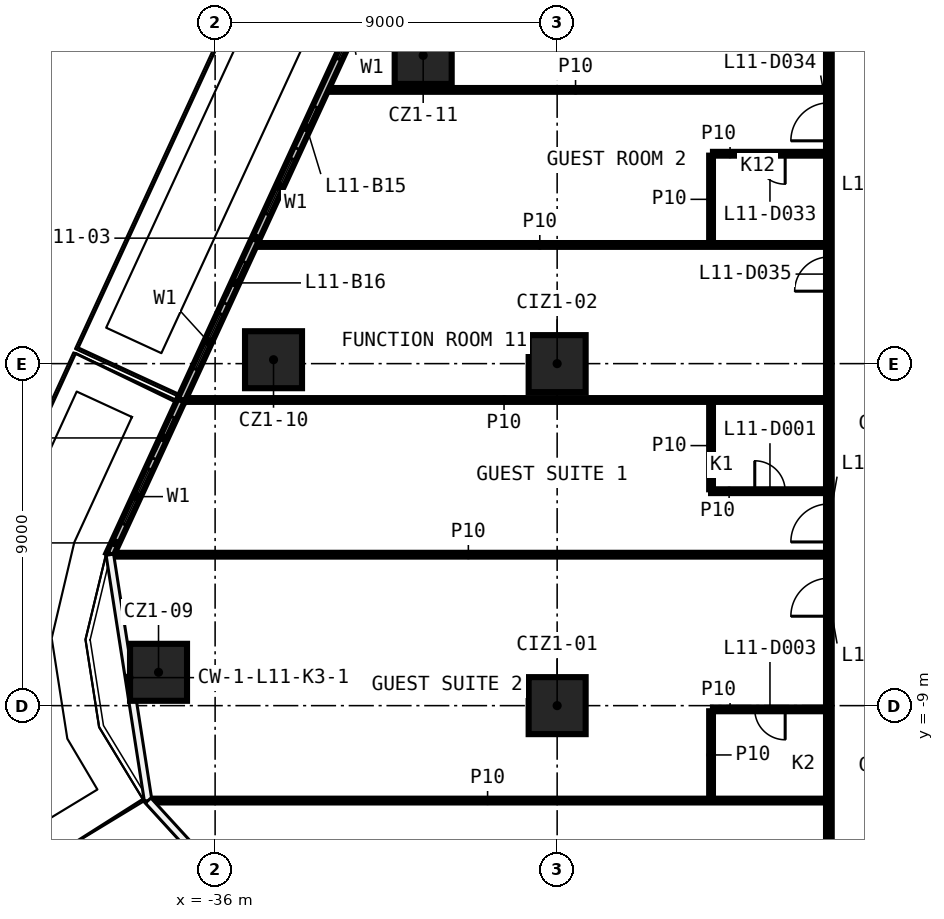
"""IFC4 building model, lengths in metres.
Left out: names, types, materials, properties, quantities, classifications, styles, units other than length and angle.
Written with IfcOpenShell. Run it as: python <this file> out.ifc"""

import sys

from ifc_helpers import new_model, si_unit, direction, frame, frame_2d, origin, origin_2d, place, context, subcontext, project, spatial, rectangle, extrude, element, fill, save


model = new_model("IFC4")
c1 = context("Model", 3, precision=1e-05, world=origin(), true_north=direction((0.0, 1.0)))
c2 = subcontext(c1, "Body", "Model", "MODEL_VIEW")
j1 = project(units=[si_unit("LENGTHUNIT", "METRE"), si_unit("PLANEANGLEUNIT", "RADIAN")], contexts=[c1])
p1 = place(None, origin())
s1 = spatial("IfcSite", under=j1, at=p1, CompositionType="ELEMENT")
p2 = place(p1, origin())
s2 = spatial("IfcBuilding", under=s1, at=p2, CompositionType="ELEMENT")
p3 = place(p2, frame((0.0, 0.0, 62.5)))
s3 = spatial("IfcBuildingStorey", under=s2, at=p3, CompositionType="ELEMENT", Elevation=62.5)
for number, where, z_axis, x_axis in (
    (1, (-37.489, -8.123, 0.0), (0.0, 0.0, 1.0), (1.0, 0.0, 0.0)),
    (2, (-34.463, 0.103, 0.0), (0.0, 0.0, 1.0), (1.0, 0.0, 0.0)),
    (3, (-30.525, 8.111, 0.0), (0.0, 0.0, 1.0), (1.0, 0.0, 0.0)),
    (4, (-27.0, -9.0, 0.0), (0.0, 0.0, 1.0), (1.0, 0.0, 0.0)),
    (5, (-27.0, 0.0, 0.0), (0.0, 0.0, 1.0), (1.0, 0.0, 0.0)),
):
    element("IfcColumn", number, at=place(p3, frame(where, z_axis=z_axis, x_axis=x_axis)), inside=s3, PredefinedType="COLUMN", context=c2, shape_type="SweptSolid", body=[
        extrude(rectangle(XDim=1.5, YDim=1.5, at=origin_2d()), origin(), (0.0, 0.0, 1.0), 3.3),
    ])
p4 = place(p3, frame((-37.736, -11.498, 0.0), z_axis=(0.0, 0.0, 1.0), x_axis=(1.0, 0.0, 0.0)))
e6 = element("IfcWall", 6, at=p4, inside=s3, PredefinedType="PARTITIONING", context=c2, shape_type="SweptSolid", body=[
    extrude(rectangle(XDim=17.811, YDim=0.1, at=frame_2d((8.905, 0.0))), origin(), (0.0, 0.0, 1.0), 3.3),
])
p5 = place(p3, frame((-19.925, -9.098, 0.0), z_axis=(0.0, 0.0, 1.0), x_axis=(-1.0, 0.0, 0.0)))
e7 = element("IfcWall", 7, at=p5, inside=s3, PredefinedType="PARTITIONING", context=c2, shape_type="SweptSolid", body=[
    extrude(rectangle(XDim=2.975, YDim=0.1, at=frame_2d((1.487, 0.0))), origin(), (0.0, 0.0, 1.0), 3.3),
])
p6 = place(p5, frame((1.075, 0.0, 0.0)))
e8 = element("IfcOpeningElement", 8, at=p6, cuts=e7, PredefinedType="OPENING", context=c2, shape_type="SweptSolid", body=[
    extrude(rectangle(XDim=0.8, YDim=2.1, at=frame_2d((0.4, 1.05))), frame((0.0, 0.06, 0.0), z_axis=(0.0, -1.0, 0.0), x_axis=(1.0, 0.0, 0.0)), (0.0, 0.0, 1.0), 0.12),
])
p7 = place(p3, frame((-38.748, -5.028, 0.0), z_axis=(0.0, 0.0, 1.0), x_axis=(1.0, 0.0, 0.0)))
e9 = element("IfcWall", 9, at=p7, inside=s3, PredefinedType="PARTITIONING", context=c2, shape_type="SweptSolid", body=[
    extrude(rectangle(XDim=18.823, YDim=0.1, at=frame_2d((9.411, 0.0))), origin(), (0.0, 0.0, 1.0), 3.3),
])
p8 = place(p3, frame((-22.95, -3.357, 0.0), z_axis=(0.0, 0.0, 1.0), x_axis=(1.0, 0.0, 0.0)))
e10 = element("IfcWall", 10, at=p8, inside=s3, PredefinedType="PARTITIONING", context=c2, shape_type="SweptSolid", body=[
    extrude(rectangle(XDim=3.025, YDim=0.1, at=frame_2d((1.512, 0.0))), origin(), (0.0, 0.0, 1.0), 3.3),
])
p9 = place(p8, frame((1.15, 0.0, 0.0)))
e11 = element("IfcOpeningElement", 11, at=p9, cuts=e10, PredefinedType="OPENING", context=c2, shape_type="SweptSolid", body=[
    extrude(rectangle(XDim=0.8, YDim=2.1, at=frame_2d((0.4, 1.05))), frame((0.0, 0.06, 0.0), z_axis=(0.0, -1.0, 0.0), x_axis=(1.0, 0.0, 0.0)), (0.0, 0.0, 1.0), 0.12),
])
p10 = place(p3, frame((-36.87, -0.957, 0.0), z_axis=(0.0, 0.0, 1.0), x_axis=(1.0, 0.0, 0.0)))
e12 = element("IfcWall", 12, at=p10, inside=s3, PredefinedType="PARTITIONING", context=c2, shape_type="SweptSolid", body=[
    extrude(rectangle(XDim=16.945, YDim=0.1, at=frame_2d((8.472, 0.0))), origin(), (0.0, 0.0, 1.0), 3.3),
])
p11 = place(p3, frame((-34.988, 3.123, 0.0), z_axis=(0.0, 0.0, 1.0), x_axis=(1.0, 0.0, 0.0)))
e13 = element("IfcWall", 13, at=p11, inside=s3, PredefinedType="PARTITIONING", context=c2, shape_type="SweptSolid", body=[
    extrude(rectangle(XDim=15.063, YDim=0.1, at=frame_2d((7.531, 0.0))), origin(), (0.0, 0.0, 1.0), 3.3),
])
p12 = place(p3, frame((-19.925, 5.523, 0.0), z_axis=(0.0, 0.0, 1.0), x_axis=(-1.0, 0.0, 0.0)))
e14 = element("IfcWall", 14, at=p12, inside=s3, PredefinedType="PARTITIONING", context=c2, shape_type="SweptSolid", body=[
    extrude(rectangle(XDim=2.975, YDim=0.1, at=frame_2d((1.487, 0.0))), origin(), (0.0, 0.0, 1.0), 3.3),
])
p13 = place(p12, frame((1.075, 0.0, 0.0)))
e15 = element("IfcOpeningElement", 15, at=p13, cuts=e14, PredefinedType="OPENING", context=c2, shape_type="SweptSolid", body=[
    extrude(rectangle(XDim=0.8, YDim=2.1, at=frame_2d((0.4, 1.05))), frame((0.0, 0.06, 0.0), z_axis=(0.0, -1.0, 0.0), x_axis=(1.0, 0.0, 0.0)), (0.0, 0.0, 1.0), 0.12),
])
p14 = place(p3, frame((-33.106, 7.203, 0.0), z_axis=(0.0, 0.0, 1.0), x_axis=(1.0, 0.0, 0.0)))
e16 = element("IfcWall", 16, at=p14, inside=s3, PredefinedType="PARTITIONING", context=c2, shape_type="SweptSolid", body=[
    extrude(rectangle(XDim=13.181, YDim=0.1, at=frame_2d((6.591, 0.0))), origin(), (0.0, 0.0, 1.0), 3.3),
])
p15 = place(p3, frame((-19.85, -16.775, 0.0), z_axis=(0.0, 0.0, 1.0), x_axis=(0.0, 1.0, 0.0)))
e17 = element("IfcWall", 17, at=p15, inside=s3, PredefinedType="PARTITIONING", context=c2, shape_type="SweptSolid", body=[
    extrude(rectangle(XDim=33.55, YDim=0.15, at=frame_2d((16.775, 0.0))), origin(), (0.0, 0.0, 1.0), 3.3),
])
p16 = place(p15, frame((12.083, 0.0, 0.0)))
e18 = element("IfcOpeningElement", 18, at=p16, cuts=e17, PredefinedType="OPENING", context=c2, shape_type="SweptSolid", body=[
    extrude(rectangle(XDim=1.0, YDim=2.1, at=frame_2d((0.5, 1.05))), frame((0.0, 0.085, 0.0), z_axis=(0.0, -1.0, 0.0), x_axis=(1.0, 0.0, 0.0)), (0.0, 0.0, 1.0), 0.17),
])
p17 = place(p15, frame((10.128, 0.0, 0.0)))
e19 = element("IfcOpeningElement", 19, at=p17, cuts=e17, PredefinedType="OPENING", context=c2, shape_type="SweptSolid", body=[
    extrude(rectangle(XDim=1.0, YDim=2.1, at=frame_2d((0.5, 1.05))), frame((0.0, 0.085, 0.0), z_axis=(0.0, -1.0, 0.0), x_axis=(1.0, 0.0, 0.0)), (0.0, 0.0, 1.0), 0.17),
])
p18 = place(p15, frame((3.259, 0.0, 0.0)))
e20 = element("IfcOpeningElement", 20, at=p18, cuts=e17, PredefinedType="OPENING", context=c2, shape_type="SweptSolid", body=[
    extrude(rectangle(XDim=0.9, YDim=2.1, at=frame_2d((0.45, 1.05))), frame((0.0, 0.085, 0.0), z_axis=(0.0, -1.0, 0.0), x_axis=(1.0, 0.0, 0.0)), (0.0, 0.0, 1.0), 0.17),
])
p19 = place(p15, frame((30.799, 0.0, 0.0)))
e21 = element("IfcOpeningElement", 21, at=p19, cuts=e17, PredefinedType="OPENING", context=c2, shape_type="SweptSolid", body=[
    extrude(rectangle(XDim=1.0, YDim=2.1, at=frame_2d((0.5, 1.05))), frame((0.0, 0.085, 0.0), z_axis=(0.0, -1.0, 0.0), x_axis=(1.0, 0.0, 0.0)), (0.0, 0.0, 1.0), 0.17),
])
p20 = place(p15, frame((22.638, 0.0, 0.0)))
e22 = element("IfcOpeningElement", 22, at=p20, cuts=e17, PredefinedType="OPENING", context=c2, shape_type="SweptSolid", body=[
    extrude(rectangle(XDim=1.0, YDim=2.1, at=frame_2d((0.5, 1.05))), frame((0.0, 0.085, 0.0), z_axis=(0.0, -1.0, 0.0), x_axis=(1.0, 0.0, 0.0)), (0.0, 0.0, 1.0), 0.17),
])
p21 = place(p15, frame((18.681, 0.0, 0.0)))
e23 = element("IfcOpeningElement", 23, at=p21, cuts=e17, PredefinedType="OPENING", context=c2, shape_type="SweptSolid", body=[
    extrude(rectangle(XDim=0.9, YDim=2.1, at=frame_2d((0.45, 1.05))), frame((0.0, 0.085, 0.0), z_axis=(0.0, -1.0, 0.0), x_axis=(1.0, 0.0, 0.0)), (0.0, 0.0, 1.0), 0.17),
])
for number, where, z_axis, x_axis in (
    (24, (-22.95, -11.448, 0.0), (0.0, 0.0, 1.0), (0.0, 1.0, 0.0)),
    (25, (-22.95, -3.307, 0.0), (0.0, 0.0, 1.0), (0.0, 1.0, 0.0)),
):
    element("IfcWall", number, at=place(p3, frame(where, z_axis=z_axis, x_axis=x_axis)), inside=s3, PredefinedType="PARTITIONING", context=c2, shape_type="SweptSolid", body=[
        extrude(rectangle(XDim=2.3, YDim=0.1, at=frame_2d((1.15, 0.0))), origin(), (0.0, 0.0, 1.0), 3.3),
    ])
p22 = place(p3, frame((-22.95, 3.173, 0.0), z_axis=(0.0, 0.0, 1.0), x_axis=(0.0, 1.0, 0.0)))
e26 = element("IfcWall", 26, at=p22, inside=s3, PredefinedType="PARTITIONING", context=c2, shape_type="SweptSolid", body=[
    extrude(rectangle(XDim=2.3, YDim=0.1, at=frame_2d((1.15, 0.0))), origin(), (0.0, 0.0, 1.0), 3.3),
])
p23 = place(p3, frame((-25.601, 23.524, 0.0), z_axis=(0.0, 0.0, 1.0), x_axis=(-0.418809499218, -0.908074117771, 0.0)))
e27 = element("IfcWall", 27, at=p23, inside=s3, PredefinedType="SOLIDWALL", context=c2, shape_type="SweptSolid", body=[
    extrude(rectangle(XDim=26.959, YDim=0.2, at=frame_2d((13.479, 0.0))), origin(), (0.0, 0.0, 1.0), 3.3),
])
p24 = place(p23, frame((2.0, 0.0, 0.6)))
e28 = element("IfcOpeningElement", 28, at=p24, cuts=e27, PredefinedType="OPENING", context=c2, shape_type="SweptSolid", body=[
    extrude(rectangle(XDim=1.6, YDim=2.4, at=frame_2d((0.8, 1.2))), frame((0.0, 0.11, 0.0), z_axis=(0.0, -1.0, 0.0), x_axis=(1.0, 0.0, 0.0)), (0.0, 0.0, 1.0), 0.22),
])
p25 = place(p23, frame((0.5, 0.0, 0.0)))
e29 = element("IfcOpeningElement", 29, at=p25, cuts=e27, PredefinedType="OPENING", context=c2, shape_type="SweptSolid", body=[
    extrude(rectangle(XDim=1.2, YDim=2.4, at=frame_2d((0.6, 1.2))), frame((0.0, 0.11, 0.0), z_axis=(0.0, -1.0, 0.0), x_axis=(1.0, 0.0, 0.0)), (0.0, 0.0, 1.0), 0.22),
])
p26 = place(p23, frame((6.493, 0.0, 0.6)))
e30 = element("IfcOpeningElement", 30, at=p26, cuts=e27, PredefinedType="OPENING", context=c2, shape_type="SweptSolid", body=[
    extrude(rectangle(XDim=1.6, YDim=2.4, at=frame_2d((0.8, 1.2))), frame((0.0, 0.11, 0.0), z_axis=(0.0, -1.0, 0.0), x_axis=(1.0, 0.0, 0.0)), (0.0, 0.0, 1.0), 0.22),
])
p27 = place(p23, frame((4.993, 0.0, 0.0)))
e31 = element("IfcOpeningElement", 31, at=p27, cuts=e27, PredefinedType="OPENING", context=c2, shape_type="SweptSolid", body=[
    extrude(rectangle(XDim=1.2, YDim=2.4, at=frame_2d((0.6, 1.2))), frame((0.0, 0.11, 0.0), z_axis=(0.0, -1.0, 0.0), x_axis=(1.0, 0.0, 0.0)), (0.0, 0.0, 1.0), 0.22),
])
p28 = place(p23, frame((10.987, 0.0, 0.6)))
e32 = element("IfcOpeningElement", 32, at=p28, cuts=e27, PredefinedType="OPENING", context=c2, shape_type="SweptSolid", body=[
    extrude(rectangle(XDim=1.6, YDim=2.4, at=frame_2d((0.8, 1.2))), frame((0.0, 0.11, 0.0), z_axis=(0.0, -1.0, 0.0), x_axis=(1.0, 0.0, 0.0)), (0.0, 0.0, 1.0), 0.22),
])
p29 = place(p23, frame((9.487, 0.0, 0.0)))
e33 = element("IfcOpeningElement", 33, at=p29, cuts=e27, PredefinedType="OPENING", context=c2, shape_type="SweptSolid", body=[
    extrude(rectangle(XDim=1.2, YDim=2.4, at=frame_2d((0.6, 1.2))), frame((0.0, 0.11, 0.0), z_axis=(0.0, -1.0, 0.0), x_axis=(1.0, 0.0, 0.0)), (0.0, 0.0, 1.0), 0.22),
])
p30 = place(p23, frame((15.48, 0.0, 0.6)))
e34 = element("IfcOpeningElement", 34, at=p30, cuts=e27, PredefinedType="OPENING", context=c2, shape_type="SweptSolid", body=[
    extrude(rectangle(XDim=1.6, YDim=2.4, at=frame_2d((0.8, 1.2))), frame((0.0, 0.11, 0.0), z_axis=(0.0, -1.0, 0.0), x_axis=(1.0, 0.0, 0.0)), (0.0, 0.0, 1.0), 0.22),
])
p31 = place(p23, frame((13.98, 0.0, 0.0)))
e35 = element("IfcOpeningElement", 35, at=p31, cuts=e27, PredefinedType="OPENING", context=c2, shape_type="SweptSolid", body=[
    extrude(rectangle(XDim=1.2, YDim=2.4, at=frame_2d((0.6, 1.2))), frame((0.0, 0.11, 0.0), z_axis=(0.0, -1.0, 0.0), x_axis=(1.0, 0.0, 0.0)), (0.0, 0.0, 1.0), 0.22),
])
p32 = place(p23, frame((19.973, 0.0, 0.6)))
e36 = element("IfcOpeningElement", 36, at=p32, cuts=e27, PredefinedType="OPENING", context=c2, shape_type="SweptSolid", body=[
    extrude(rectangle(XDim=1.6, YDim=2.4, at=frame_2d((0.8, 1.2))), frame((0.0, 0.11, 0.0), z_axis=(0.0, -1.0, 0.0), x_axis=(1.0, 0.0, 0.0)), (0.0, 0.0, 1.0), 0.22),
])
p33 = place(p23, frame((18.473, 0.0, 0.0)))
e37 = element("IfcOpeningElement", 37, at=p33, cuts=e27, PredefinedType="OPENING", context=c2, shape_type="SweptSolid", body=[
    extrude(rectangle(XDim=1.2, YDim=2.4, at=frame_2d((0.6, 1.2))), frame((0.0, 0.11, 0.0), z_axis=(0.0, -1.0, 0.0), x_axis=(1.0, 0.0, 0.0)), (0.0, 0.0, 1.0), 0.22),
])
p34 = place(p23, frame((24.466, 0.0, 0.6)))
e38 = element("IfcOpeningElement", 38, at=p34, cuts=e27, PredefinedType="OPENING", context=c2, shape_type="SweptSolid", body=[
    extrude(rectangle(XDim=1.6, YDim=2.4, at=frame_2d((0.8, 1.2))), frame((0.0, 0.11, 0.0), z_axis=(0.0, -1.0, 0.0), x_axis=(1.0, 0.0, 0.0)), (0.0, 0.0, 1.0), 0.22),
])
p35 = place(p23, frame((22.966, 0.0, 0.0)))
e39 = element("IfcOpeningElement", 39, at=p35, cuts=e27, PredefinedType="OPENING", context=c2, shape_type="SweptSolid", body=[
    extrude(rectangle(XDim=1.2, YDim=2.4, at=frame_2d((0.6, 1.2))), frame((0.0, 0.11, 0.0), z_axis=(0.0, -1.0, 0.0), x_axis=(1.0, 0.0, 0.0)), (0.0, 0.0, 1.0), 0.22),
])
p36 = place(p3, frame((-36.892, -0.957, 0.0), z_axis=(0.0, 0.0, 1.0), x_axis=(-0.418806078916, -0.908075695228, 0.0)))
e40 = element("IfcWall", 40, at=p36, inside=s3, PredefinedType="SOLIDWALL", context=c2, shape_type="SweptSolid", body=[
    extrude(rectangle(XDim=4.483, YDim=0.2, at=frame_2d((2.242, 0.0))), origin(), (0.0, 0.0, 1.0), 3.3),
])
p37 = place(p36, frame((2.0, 0.0, 0.6)))
e41 = element("IfcOpeningElement", 41, at=p37, cuts=e40, PredefinedType="OPENING", context=c2, shape_type="SweptSolid", body=[
    extrude(rectangle(XDim=1.6, YDim=2.4, at=frame_2d((0.8, 1.2))), frame((0.0, 0.11, 0.0), z_axis=(0.0, -1.0, 0.0), x_axis=(1.0, 0.0, 0.0)), (0.0, 0.0, 1.0), 0.22),
])
p38 = place(p36, frame((0.5, 0.0, 0.0)))
e42 = element("IfcOpeningElement", 42, at=p38, cuts=e40, PredefinedType="OPENING", context=c2, shape_type="SweptSolid", body=[
    extrude(rectangle(XDim=1.2, YDim=2.4, at=frame_2d((0.6, 1.2))), frame((0.0, 0.11, 0.0), z_axis=(0.0, -1.0, 0.0), x_axis=(1.0, 0.0, 0.0)), (0.0, 0.0, 1.0), 0.22),
])
p39 = place(p9, origin())
e43 = element("IfcDoor", 43, at=p39, inside=s3, OperationType="SINGLE_SWING_LEFT", PredefinedType="DOOR", context=c2, shape_type="SweptSolid", body=[
    extrude(rectangle(XDim=0.8, YDim=2.1, at=frame_2d((0.4, 1.05))), frame((0.0, 0.025, 0.0), z_axis=(0.0, -1.0, 0.0), x_axis=(1.0, 0.0, 0.0)), (0.0, 0.0, 1.0), 0.05),
])
fill(e11, e43)
p40 = place(p16, origin())
e44 = element("IfcDoor", 44, at=p40, inside=s3, OperationType="SINGLE_SWING_RIGHT", PredefinedType="DOOR", context=c2, shape_type="SweptSolid", body=[
    extrude(rectangle(XDim=1.0, YDim=2.1, at=frame_2d((0.5, 1.05))), frame((0.0, 0.025, 0.0), z_axis=(0.0, -1.0, 0.0), x_axis=(1.0, 0.0, 0.0)), (0.0, 0.0, 1.0), 0.05),
])
fill(e18, e44)
p41 = place(p6, origin())
e45 = element("IfcDoor", 45, at=p41, inside=s3, OperationType="SINGLE_SWING_RIGHT", PredefinedType="DOOR", context=c2, shape_type="SweptSolid", body=[
    extrude(rectangle(XDim=0.8, YDim=2.1, at=frame_2d((0.4, 1.05))), frame((0.0, 0.025, 0.0), z_axis=(0.0, -1.0, 0.0), x_axis=(1.0, 0.0, 0.0)), (0.0, 0.0, 1.0), 0.05),
])
fill(e8, e45)
p42 = place(p17, origin())
e46 = element("IfcDoor", 46, at=p42, inside=s3, OperationType="SINGLE_SWING_LEFT", PredefinedType="DOOR", context=c2, shape_type="SweptSolid", body=[
    extrude(rectangle(XDim=1.0, YDim=2.1, at=frame_2d((0.5, 1.05))), frame((0.0, 0.025, 0.0), z_axis=(0.0, -1.0, 0.0), x_axis=(1.0, 0.0, 0.0)), (0.0, 0.0, 1.0), 0.05),
])
fill(e19, e46)
p43 = place(p13, origin())
e47 = element("IfcDoor", 47, at=p43, inside=s3, OperationType="SINGLE_SWING_RIGHT", PredefinedType="DOOR", context=c2, shape_type="SweptSolid", body=[
    extrude(rectangle(XDim=0.8, YDim=2.1, at=frame_2d((0.4, 1.05))), frame((0.0, 0.025, 0.0), z_axis=(0.0, -1.0, 0.0), x_axis=(1.0, 0.0, 0.0)), (0.0, 0.0, 1.0), 0.05),
])
fill(e15, e47)
p44 = place(p20, origin())
e48 = element("IfcDoor", 48, at=p44, inside=s3, OperationType="SINGLE_SWING_LEFT", PredefinedType="DOOR", context=c2, shape_type="SweptSolid", body=[
    extrude(rectangle(XDim=1.0, YDim=2.1, at=frame_2d((0.5, 1.05))), frame((0.0, 0.025, 0.0), z_axis=(0.0, -1.0, 0.0), x_axis=(1.0, 0.0, 0.0)), (0.0, 0.0, 1.0), 0.05),
])
fill(e22, e48)
p45 = place(p21, origin())
e49 = element("IfcDoor", 49, at=p45, inside=s3, OperationType="SINGLE_SWING_RIGHT", PredefinedType="DOOR", context=c2, shape_type="SweptSolid", body=[
    extrude(rectangle(XDim=0.9, YDim=2.1, at=frame_2d((0.45, 1.05))), frame((0.0, 0.025, 0.0), z_axis=(0.0, -1.0, 0.0), x_axis=(1.0, 0.0, 0.0)), (0.0, 0.0, 1.0), 0.05),
])
fill(e23, e49)
p46 = place(p30, origin())
e50 = element("IfcWindow", 50, at=p46, inside=s3, PartitioningType="SINGLE_PANEL", PredefinedType="WINDOW", context=c2, shape_type="SweptSolid", body=[
    extrude(rectangle(XDim=1.6, YDim=2.4, at=frame_2d((0.8, 1.2))), frame((0.0, 0.03, 0.0), z_axis=(0.0, -1.0, 0.0), x_axis=(1.0, 0.0, 0.0)), (0.0, 0.0, 1.0), 0.06),
])
fill(e34, e50)
p47 = place(p32, origin())
e51 = element("IfcWindow", 51, at=p47, inside=s3, PartitioningType="SINGLE_PANEL", PredefinedType="WINDOW", context=c2, shape_type="SweptSolid", body=[
    extrude(rectangle(XDim=1.6, YDim=2.4, at=frame_2d((0.8, 1.2))), frame((0.0, 0.03, 0.0), z_axis=(0.0, -1.0, 0.0), x_axis=(1.0, 0.0, 0.0)), (0.0, 0.0, 1.0), 0.06),
])
fill(e36, e51)
p48 = place(p33, origin())
e52 = element("IfcDoor", 52, at=p48, inside=s3, OperationType="SLIDING_TO_LEFT", PredefinedType="DOOR", context=c2, shape_type="SweptSolid", body=[
    extrude(rectangle(XDim=1.2, YDim=2.4, at=frame_2d((0.6, 1.2))), frame((0.0, 0.025, 0.0), z_axis=(0.0, -1.0, 0.0), x_axis=(1.0, 0.0, 0.0)), (0.0, 0.0, 1.0), 0.05),
])
fill(e37, e52)
p49 = place(p34, origin())
e53 = element("IfcWindow", 53, at=p49, inside=s3, PartitioningType="SINGLE_PANEL", PredefinedType="WINDOW", context=c2, shape_type="SweptSolid", body=[
    extrude(rectangle(XDim=1.6, YDim=2.4, at=frame_2d((0.8, 1.2))), frame((0.0, 0.03, 0.0), z_axis=(0.0, -1.0, 0.0), x_axis=(1.0, 0.0, 0.0)), (0.0, 0.0, 1.0), 0.06),
])
fill(e38, e53)
p50 = place(p35, origin())
e54 = element("IfcDoor", 54, at=p50, inside=s3, OperationType="SLIDING_TO_LEFT", PredefinedType="DOOR", context=c2, shape_type="SweptSolid", body=[
    extrude(rectangle(XDim=1.2, YDim=2.4, at=frame_2d((0.6, 1.2))), frame((0.0, 0.025, 0.0), z_axis=(0.0, -1.0, 0.0), x_axis=(1.0, 0.0, 0.0)), (0.0, 0.0, 1.0), 0.05),
])
fill(e39, e54)
p51 = place(p37, origin())
e55 = element("IfcWindow", 55, at=p51, inside=s3, PartitioningType="SINGLE_PANEL", PredefinedType="WINDOW", context=c2, shape_type="SweptSolid", body=[
    extrude(rectangle(XDim=1.6, YDim=2.4, at=frame_2d((0.8, 1.2))), frame((0.0, 0.03, 0.0), z_axis=(0.0, -1.0, 0.0), x_axis=(1.0, 0.0, 0.0)), (0.0, 0.0, 1.0), 0.06),
])
fill(e41, e55)
p52 = place(p38, origin())
e56 = element("IfcDoor", 56, at=p52, inside=s3, OperationType="SLIDING_TO_LEFT", PredefinedType="DOOR", context=c2, shape_type="SweptSolid", body=[
    extrude(rectangle(XDim=1.2, YDim=2.4, at=frame_2d((0.6, 1.2))), frame((0.0, 0.025, 0.0), z_axis=(0.0, -1.0, 0.0), x_axis=(1.0, 0.0, 0.0)), (0.0, 0.0, 1.0), 0.05),
])
fill(e42, e56)
save(model, sys.argv[1])
